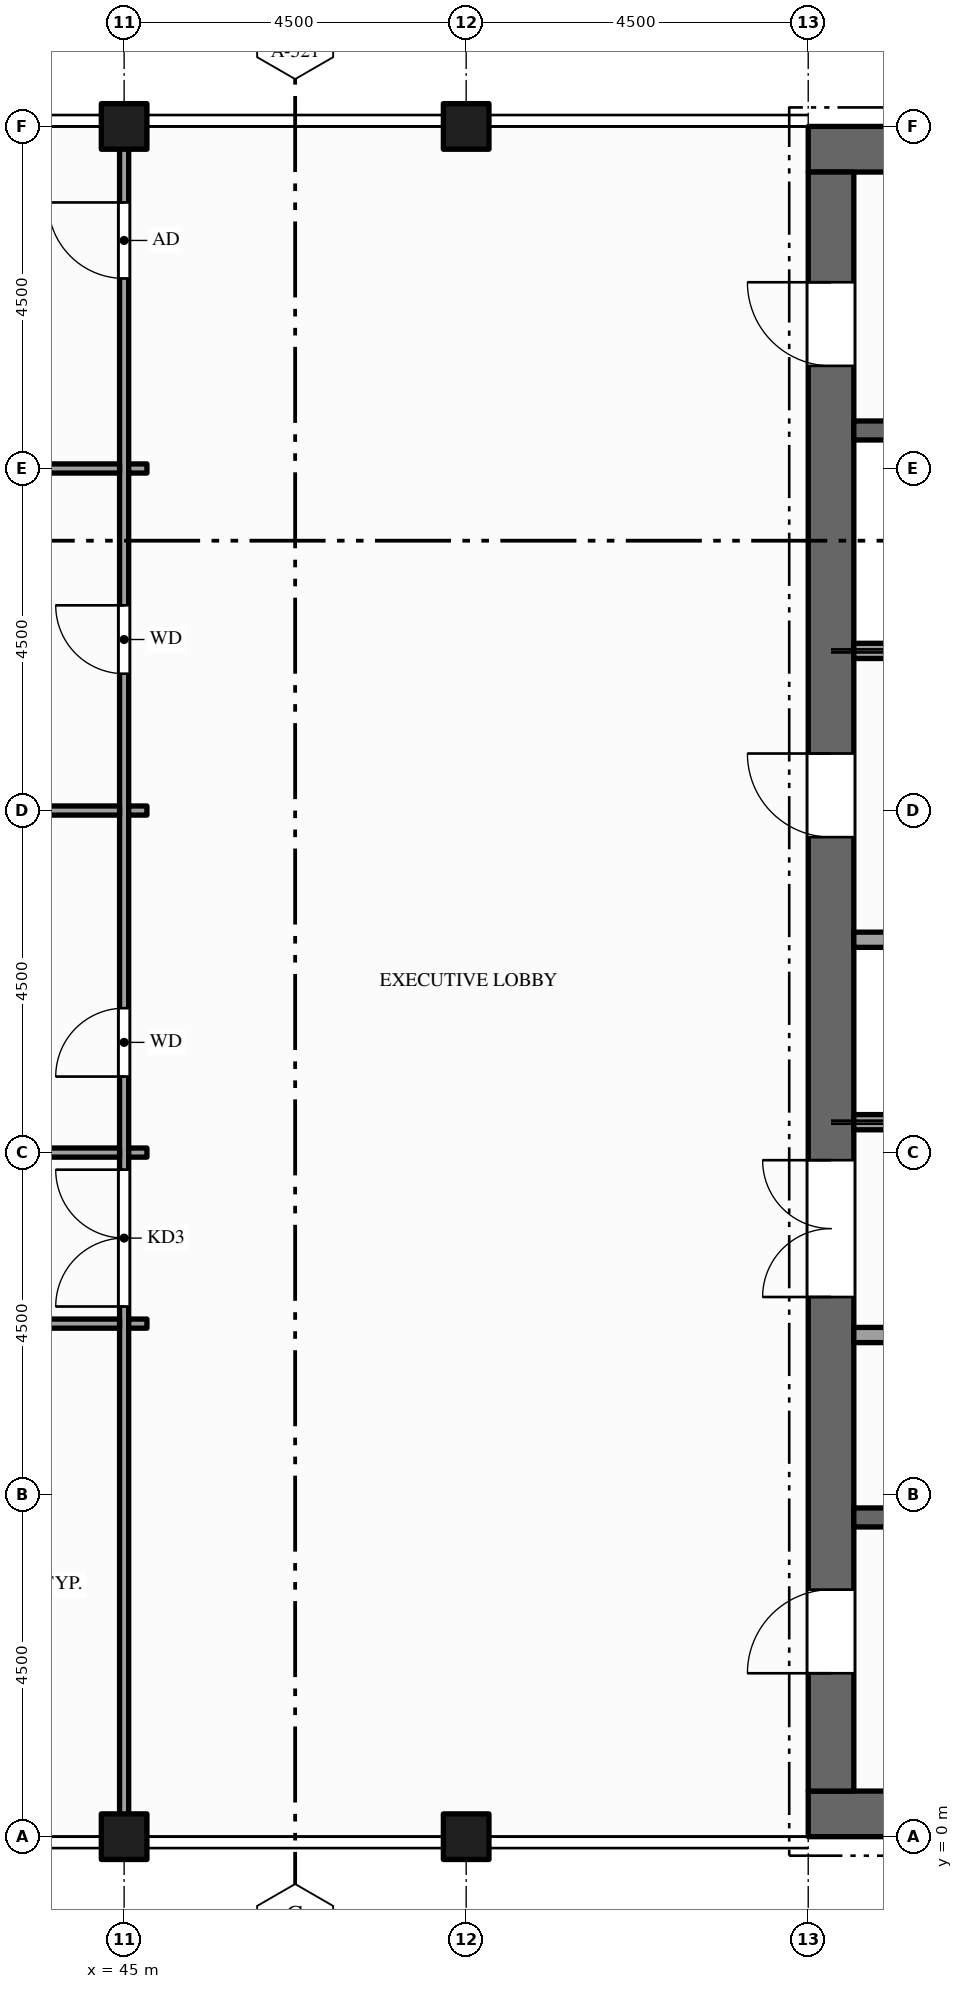
"""IFC4 building model, lengths in metres.
Left out: names, types, materials, properties, quantities, classifications, styles, units other than length and angle.
Written with IfcOpenShell. Run it as: python <this file> out.ifc"""

import sys

from ifc_helpers import new_model, si_unit, direction, frame, frame_2d, origin, origin_2d, place, context, subcontext, project, spatial, rectangle, hollow_rectangle, extrude, element, fill, save


model = new_model("IFC4")
c1 = context("Model", 3, precision=1e-05, world=origin(), true_north=direction((0.0, 1.0)))
c2 = subcontext(c1, "Body", "Model", "MODEL_VIEW")
j1 = project(units=[si_unit("LENGTHUNIT", "METRE"), si_unit("PLANEANGLEUNIT", "RADIAN")], contexts=[c1])
p1 = place(None, origin())
s1 = spatial("IfcSite", under=j1, at=p1, CompositionType="ELEMENT")
p2 = place(p1, origin())
s2 = spatial("IfcBuilding", under=s1, at=p2, CompositionType="ELEMENT")
p3 = place(p2, frame((0.0, 0.0, 341.0)))
s3 = spatial("IfcBuildingStorey", under=s2, at=p3, CompositionType="ELEMENT", Elevation=341.0)
for number, where, z_axis, x_axis in (
    (1, (67.5, 0.3, -0.15), (0.0, 0.0, 1.0), (-1.0, 0.0, 0.0)),
    (2, (54.0, 22.2, -0.15), (0.0, 0.0, 1.0), (1.0, 0.0, 0.0)),
):
    element("IfcWall", number, at=place(p3, frame(where, z_axis=z_axis, x_axis=x_axis)), inside=s3, PredefinedType="SHEAR", context=c2, shape_type="SweptSolid", body=[
        extrude(rectangle(XDim=13.5, YDim=0.6, at=frame_2d((6.75, 0.0))), origin(), (0.0, 0.0, 1.0), 4.5),
    ])
p4 = place(p3, frame((54.3, 0.6, -0.15), z_axis=(0.0, 0.0, 1.0), x_axis=(0.0, 1.0, 0.0)))
e3 = element("IfcWall", 3, at=p4, inside=s3, PredefinedType="SHEAR", context=c2, shape_type="SweptSolid", body=[
    extrude(rectangle(XDim=21.3, YDim=0.6, at=frame_2d((10.65, 0.0))), origin(), (0.0, 0.0, 1.0), 4.5),
])
p5 = place(p4, frame((6.5, 0.0, 0.15)))
e4 = element("IfcOpeningElement", 4, at=p5, cuts=e3, PredefinedType="OPENING", context=c2, shape_type="SweptSolid", body=[
    extrude(rectangle(XDim=1.8, YDim=2.1, at=frame_2d((0.9, 1.05))), frame((0.0, 0.31, 0.0), z_axis=(0.0, -1.0, 0.0), x_axis=(1.0, 0.0, 0.0)), (0.0, 0.0, 1.0), 0.62),
])
p6 = place(p4, frame((12.55, 0.0, 0.15)))
e5 = element("IfcOpeningElement", 5, at=p6, cuts=e3, PredefinedType="OPENING", context=c2, shape_type="SweptSolid", body=[
    extrude(rectangle(XDim=1.1, YDim=2.1, at=frame_2d((0.55, 1.05))), frame((0.0, 0.31, 0.0), z_axis=(0.0, -1.0, 0.0), x_axis=(1.0, 0.0, 0.0)), (0.0, 0.0, 1.0), 0.62),
])
p7 = place(p4, frame((1.55, 0.0, 0.15)))
e6 = element("IfcOpeningElement", 6, at=p7, cuts=e3, PredefinedType="OPENING", context=c2, shape_type="SweptSolid", body=[
    extrude(rectangle(XDim=1.1, YDim=2.1, at=frame_2d((0.55, 1.05))), frame((0.0, 0.31, 0.0), z_axis=(0.0, -1.0, 0.0), x_axis=(1.0, 0.0, 0.0)), (0.0, 0.0, 1.0), 0.62),
])
p8 = place(p4, frame((18.75, 0.0, 0.15)))
e7 = element("IfcOpeningElement", 7, at=p8, cuts=e3, PredefinedType="OPENING", context=c2, shape_type="SweptSolid", body=[
    extrude(rectangle(XDim=1.1, YDim=2.1, at=frame_2d((0.55, 1.05))), frame((0.0, 0.31, 0.0), z_axis=(0.0, -1.0, 0.0), x_axis=(1.0, 0.0, 0.0)), (0.0, 0.0, 1.0), 0.62),
])
for number, where, z_axis, x_axis in (
    (8, (45.0, 0.0, -0.15), (0.0, 0.0, 1.0), (1.0, 0.0, 0.0)),
    (9, (45.0, 22.5, -0.15), (0.0, 0.0, 1.0), (1.0, 0.0, 0.0)),
    (10, (49.5, 0.0, -0.15), (0.0, 0.0, 1.0), (1.0, 0.0, 0.0)),
    (11, (49.5, 22.5, -0.15), (0.0, 0.0, 1.0), (1.0, 0.0, 0.0)),
):
    element("IfcColumn", number, at=place(p3, frame(where, z_axis=z_axis, x_axis=x_axis)), inside=s3, PredefinedType="COLUMN", context=c2, shape_type="SweptSolid", body=[
        extrude(hollow_rectangle(XDim=0.6, YDim=0.6, WallThickness=0.03, at=origin_2d()), origin(), (0.0, 0.0, 1.0), 4.45),
    ])
p9 = place(p3, frame((45.0, 0.01, 0.0), z_axis=(0.0, 0.0, 1.0), x_axis=(0.0, 1.0, 0.0)))
e12 = element("IfcWall", 12, at=p9, inside=s3, PredefinedType="PARTITIONING", context=c2, shape_type="SweptSolid", body=[
    extrude(rectangle(XDim=22.48, YDim=0.12, at=frame_2d((11.24, 0.0))), origin(), (0.0, 0.0, 1.0), 3.309),
])
p10 = place(p9, frame((6.965, 0.0, 0.0)))
e13 = element("IfcOpeningElement", 13, at=p10, cuts=e12, PredefinedType="OPENING", context=c2, shape_type="SweptSolid", body=[
    extrude(rectangle(XDim=1.8, YDim=2.1, at=frame_2d((0.9, 1.05))), frame((0.0, 0.07, 0.0), z_axis=(0.0, -1.0, 0.0), x_axis=(1.0, 0.0, 0.0)), (0.0, 0.0, 1.0), 0.14),
])
p11 = place(p9, frame((9.99, 0.0, 0.0)))
e14 = element("IfcOpeningElement", 14, at=p11, cuts=e12, PredefinedType="OPENING", context=c2, shape_type="SweptSolid", body=[
    extrude(rectangle(XDim=0.9, YDim=2.1, at=frame_2d((0.45, 1.05))), frame((0.0, 0.07, 0.0), z_axis=(0.0, -1.0, 0.0), x_axis=(1.0, 0.0, 0.0)), (0.0, 0.0, 1.0), 0.14),
])
p12 = place(p9, frame((15.29, 0.0, 0.0)))
e15 = element("IfcOpeningElement", 15, at=p12, cuts=e12, PredefinedType="OPENING", context=c2, shape_type="SweptSolid", body=[
    extrude(rectangle(XDim=0.9, YDim=2.1, at=frame_2d((0.45, 1.05))), frame((0.0, 0.07, 0.0), z_axis=(0.0, -1.0, 0.0), x_axis=(1.0, 0.0, 0.0)), (0.0, 0.0, 1.0), 0.14),
])
p13 = place(p9, frame((20.49, 0.0, 0.0)))
e16 = element("IfcOpeningElement", 16, at=p13, cuts=e12, PredefinedType="OPENING", context=c2, shape_type="SweptSolid", body=[
    extrude(rectangle(XDim=1.0, YDim=2.1, at=frame_2d((0.5, 1.05))), frame((0.0, 0.07, 0.0), z_axis=(0.0, -1.0, 0.0), x_axis=(1.0, 0.0, 0.0)), (0.0, 0.0, 1.0), 0.14),
])
p14 = place(p3, frame((54.6, 4.2, 0.0), z_axis=(0.0, 0.0, 1.0), x_axis=(1.0, 0.0, 0.0)))
e17 = element("IfcWall", 17, at=p14, inside=s3, PredefinedType="SHEAR", context=c2, shape_type="SweptSolid", body=[
    extrude(rectangle(XDim=6.675, YDim=0.25, at=frame_2d((3.337, 0.0))), origin(), (0.0, 0.0, 1.0), 4.3),
])
p15 = place(p3, frame((54.6, 6.6, 0.0), z_axis=(0.0, 0.0, 1.0), x_axis=(1.0, 0.0, 0.0)))
e18 = element("IfcWall", 18, at=p15, inside=s3, PredefinedType="PARTITIONING", context=c2, shape_type="SweptSolid", body=[
    extrude(rectangle(XDim=7.1, YDim=0.2, at=frame_2d((3.55, 0.0))), origin(), (0.0, 0.0, 1.0), 4.3),
])
p16 = place(p15, frame((3.1, 0.0, 0.0)))
e19 = element("IfcOpeningElement", 19, at=p16, cuts=e18, PredefinedType="OPENING", context=c2, shape_type="SweptSolid", body=[
    extrude(rectangle(XDim=0.9, YDim=2.1, at=frame_2d((0.45, 1.05))), frame((0.0, 0.11, 0.0), z_axis=(0.0, -1.0, 0.0), x_axis=(1.0, 0.0, 0.0)), (0.0, 0.0, 1.0), 0.22),
])
p17 = place(p3, frame((36.06, 6.75, 0.0), z_axis=(0.0, 0.0, 1.0), x_axis=(1.0, 0.0, 0.0)))
e20 = element("IfcWall", 20, at=p17, inside=s3, PredefinedType="PARTITIONING", context=c2, shape_type="SweptSolid", body=[
    extrude(rectangle(XDim=8.88, YDim=0.12, at=frame_2d((4.44, 0.0))), origin(), (0.0, 0.0, 1.0), 3.259),
])
p18 = place(p17, frame((3.94, 0.0, 0.0)))
e21 = element("IfcOpeningElement", 21, at=p18, cuts=e20, PredefinedType="OPENING", context=c2, shape_type="SweptSolid", body=[
    extrude(rectangle(XDim=1.0, YDim=2.1, at=frame_2d((0.5, 1.05))), frame((0.0, 0.07, 0.0), z_axis=(0.0, -1.0, 0.0), x_axis=(1.0, 0.0, 0.0)), (0.0, 0.0, 1.0), 0.14),
])
p19 = place(p3, frame((45.06, 6.75, 0.0), z_axis=(0.0, 0.0, 1.0), x_axis=(1.0, 0.0, 0.0)))
e22 = element("IfcWall", 22, at=p19, inside=s3, PredefinedType="PARTITIONING", context=c2, shape_type="SweptSolid", body=[
    extrude(rectangle(XDim=0.24, YDim=0.12, at=frame_2d((0.12, 0.0))), origin(), (0.0, 0.0, 1.0), 3.309),
])
p20 = place(p3, frame((40.56, 9.0, 0.0), z_axis=(0.0, 0.0, 1.0), x_axis=(1.0, 0.0, 0.0)))
e23 = element("IfcWall", 23, at=p20, inside=s3, PredefinedType="PARTITIONING", context=c2, shape_type="SweptSolid", body=[
    extrude(rectangle(XDim=4.38, YDim=0.12, at=frame_2d((2.19, 0.0))), origin(), (0.0, 0.0, 1.0), 3.309),
])
p21 = place(p3, frame((45.06, 9.0, 0.0), z_axis=(0.0, 0.0, 1.0), x_axis=(1.0, 0.0, 0.0)))
e24 = element("IfcWall", 24, at=p21, inside=s3, PredefinedType="PARTITIONING", context=c2, shape_type="SweptSolid", body=[
    extrude(rectangle(XDim=0.24, YDim=0.12, at=frame_2d((0.12, 0.0))), origin(), (0.0, 0.0, 1.0), 3.309),
])
p22 = place(p3, frame((54.6, 9.4, 0.0), z_axis=(0.0, 0.0, 1.0), x_axis=(1.0, 0.0, 0.0)))
e25 = element("IfcWall", 25, at=p22, inside=s3, PredefinedType="SOLIDWALL", context=c2, shape_type="SweptSolid", body=[
    extrude(rectangle(XDim=2.7, YDim=0.2, at=frame_2d((1.35, 0.0))), origin(), (0.0, 0.0, 1.0), 4.3),
])
p23 = place(p22, frame((0.8, 0.0, 0.012)))
e26 = element("IfcOpeningElement", 26, at=p23, cuts=e25, PredefinedType="OPENING", context=c2, shape_type="SweptSolid", body=[
    extrude(rectangle(XDim=1.1, YDim=2.1, at=frame_2d((0.55, 1.05))), frame((0.0, 0.11, 0.0), z_axis=(0.0, -1.0, 0.0), x_axis=(1.0, 0.0, 0.0)), (0.0, 0.0, 1.0), 0.22),
])
p24 = place(p3, frame((54.6, 11.8, 0.0), z_axis=(0.0, 0.0, 1.0), x_axis=(1.0, 0.0, 0.0)))
e27 = element("IfcWall", 27, at=p24, inside=s3, PredefinedType="SOLIDWALL", context=c2, shape_type="SweptSolid", body=[
    extrude(rectangle(XDim=2.7, YDim=0.2, at=frame_2d((1.35, 0.0))), origin(), (0.0, 0.0, 1.0), 4.3),
])
p25 = place(p3, frame((40.56, 13.5, 0.0), z_axis=(0.0, 0.0, 1.0), x_axis=(1.0, 0.0, 0.0)))
e28 = element("IfcWall", 28, at=p25, inside=s3, PredefinedType="PARTITIONING", context=c2, shape_type="SweptSolid", body=[
    extrude(rectangle(XDim=4.38, YDim=0.12, at=frame_2d((2.19, 0.0))), origin(), (0.0, 0.0, 1.0), 3.309),
])
p26 = place(p3, frame((45.06, 13.5, 0.0), z_axis=(0.0, 0.0, 1.0), x_axis=(1.0, 0.0, 0.0)))
e29 = element("IfcWall", 29, at=p26, inside=s3, PredefinedType="PARTITIONING", context=c2, shape_type="SweptSolid", body=[
    extrude(rectangle(XDim=0.24, YDim=0.12, at=frame_2d((0.12, 0.0))), origin(), (0.0, 0.0, 1.0), 3.309),
])
p27 = place(p3, frame((54.6, 15.6, 0.0), z_axis=(0.0, 0.0, 1.0), x_axis=(1.0, 0.0, 0.0)))
e30 = element("IfcWall", 30, at=p27, inside=s3, PredefinedType="SOLIDWALL", context=c2, shape_type="SweptSolid", body=[
    extrude(rectangle(XDim=2.7, YDim=0.2, at=frame_2d((1.35, 0.0))), origin(), (0.0, 0.0, 1.0), 4.3),
])
p28 = place(p27, frame((0.8, 0.0, 0.012)))
e31 = element("IfcOpeningElement", 31, at=p28, cuts=e30, PredefinedType="OPENING", context=c2, shape_type="SweptSolid", body=[
    extrude(rectangle(XDim=1.1, YDim=2.1, at=frame_2d((0.55, 1.05))), frame((0.0, 0.11, 0.0), z_axis=(0.0, -1.0, 0.0), x_axis=(1.0, 0.0, 0.0)), (0.0, 0.0, 1.0), 0.22),
])
p29 = place(p3, frame((40.56, 18.0, 0.0), z_axis=(0.0, 0.0, 1.0), x_axis=(1.0, 0.0, 0.0)))
e32 = element("IfcWall", 32, at=p29, inside=s3, PredefinedType="PARTITIONING", context=c2, shape_type="SweptSolid", body=[
    extrude(rectangle(XDim=4.38, YDim=0.12, at=frame_2d((2.19, 0.0))), origin(), (0.0, 0.0, 1.0), 3.309),
])
p30 = place(p3, frame((45.06, 18.0, 0.0), z_axis=(0.0, 0.0, 1.0), x_axis=(1.0, 0.0, 0.0)))
e33 = element("IfcWall", 33, at=p30, inside=s3, PredefinedType="PARTITIONING", context=c2, shape_type="SweptSolid", body=[
    extrude(rectangle(XDim=0.24, YDim=0.12, at=frame_2d((0.12, 0.0))), origin(), (0.0, 0.0, 1.0), 3.309),
])
p31 = place(p3, frame((54.6, 18.5, 0.0), z_axis=(0.0, 0.0, 1.0), x_axis=(1.0, 0.0, 0.0)))
e34 = element("IfcWall", 34, at=p31, inside=s3, PredefinedType="SHEAR", context=c2, shape_type="SweptSolid", body=[
    extrude(rectangle(XDim=6.675, YDim=0.25, at=frame_2d((3.337, 0.0))), origin(), (0.0, 0.0, 1.0), 4.3),
])
p32 = place(p5, origin())
e35 = element("IfcDoor", 35, at=p32, inside=s3, OperationType="DOUBLE_DOOR_SINGLE_SWING", PredefinedType="DOOR", context=c2, shape_type="SweptSolid", body=[
    extrude(rectangle(XDim=1.8, YDim=2.1, at=frame_2d((0.9, 1.05))), frame((0.0, 0.025, 0.0), z_axis=(0.0, -1.0, 0.0), x_axis=(1.0, 0.0, 0.0)), (0.0, 0.0, 1.0), 0.05),
])
fill(e4, e35)
p33 = place(p6, origin())
e36 = element("IfcDoor", 36, at=p33, inside=s3, OperationType="SINGLE_SWING_RIGHT", PredefinedType="DOOR", context=c2, shape_type="SweptSolid", body=[
    extrude(rectangle(XDim=1.1, YDim=2.1, at=frame_2d((0.55, 1.05))), frame((0.0, 0.025, 0.0), z_axis=(0.0, -1.0, 0.0), x_axis=(1.0, 0.0, 0.0)), (0.0, 0.0, 1.0), 0.05),
])
fill(e5, e36)
p34 = place(p7, origin())
e37 = element("IfcDoor", 37, at=p34, inside=s3, OperationType="SINGLE_SWING_LEFT", PredefinedType="DOOR", context=c2, shape_type="SweptSolid", body=[
    extrude(rectangle(XDim=1.1, YDim=2.1, at=frame_2d((0.55, 1.05))), frame((0.0, 0.025, 0.0), z_axis=(0.0, -1.0, 0.0), x_axis=(1.0, 0.0, 0.0)), (0.0, 0.0, 1.0), 0.05),
])
fill(e6, e37)
p35 = place(p8, origin())
e38 = element("IfcDoor", 38, at=p35, inside=s3, OperationType="SINGLE_SWING_RIGHT", PredefinedType="DOOR", context=c2, shape_type="SweptSolid", body=[
    extrude(rectangle(XDim=1.1, YDim=2.1, at=frame_2d((0.55, 1.05))), frame((0.0, 0.025, 0.0), z_axis=(0.0, -1.0, 0.0), x_axis=(1.0, 0.0, 0.0)), (0.0, 0.0, 1.0), 0.05),
])
fill(e7, e38)
p36 = place(p10, origin())
e39 = element("IfcDoor", 39, at=p36, inside=s3, OperationType="DOUBLE_DOOR_SINGLE_SWING", PredefinedType="DOOR", context=c2, shape_type="SweptSolid", body=[
    extrude(rectangle(XDim=1.8, YDim=2.1, at=frame_2d((0.9, 1.05))), frame((0.0, 0.025, 0.0), z_axis=(0.0, -1.0, 0.0), x_axis=(1.0, 0.0, 0.0)), (0.0, 0.0, 1.0), 0.05),
])
fill(e13, e39)
p37 = place(p11, origin())
e40 = element("IfcDoor", 40, at=p37, inside=s3, OperationType="SINGLE_SWING_LEFT", PredefinedType="DOOR", context=c2, shape_type="SweptSolid", body=[
    extrude(rectangle(XDim=0.9, YDim=2.1, at=frame_2d((0.45, 1.05))), frame((0.0, 0.025, 0.0), z_axis=(0.0, -1.0, 0.0), x_axis=(1.0, 0.0, 0.0)), (0.0, 0.0, 1.0), 0.05),
])
fill(e14, e40)
p38 = place(p12, origin())
e41 = element("IfcDoor", 41, at=p38, inside=s3, OperationType="SINGLE_SWING_RIGHT", PredefinedType="DOOR", context=c2, shape_type="SweptSolid", body=[
    extrude(rectangle(XDim=0.9, YDim=2.1, at=frame_2d((0.45, 1.05))), frame((0.0, 0.025, 0.0), z_axis=(0.0, -1.0, 0.0), x_axis=(1.0, 0.0, 0.0)), (0.0, 0.0, 1.0), 0.05),
])
fill(e15, e41)
p39 = place(p13, origin())
e42 = element("IfcDoor", 42, at=p39, inside=s3, OperationType="SINGLE_SWING_RIGHT", PredefinedType="DOOR", context=c2, shape_type="SweptSolid", body=[
    extrude(rectangle(XDim=1.0, YDim=2.1, at=frame_2d((0.5, 1.05))), frame((0.0, 0.025, 0.0), z_axis=(0.0, -1.0, 0.0), x_axis=(1.0, 0.0, 0.0)), (0.0, 0.0, 1.0), 0.05),
])
fill(e16, e42)
save(model, sys.argv[1])
